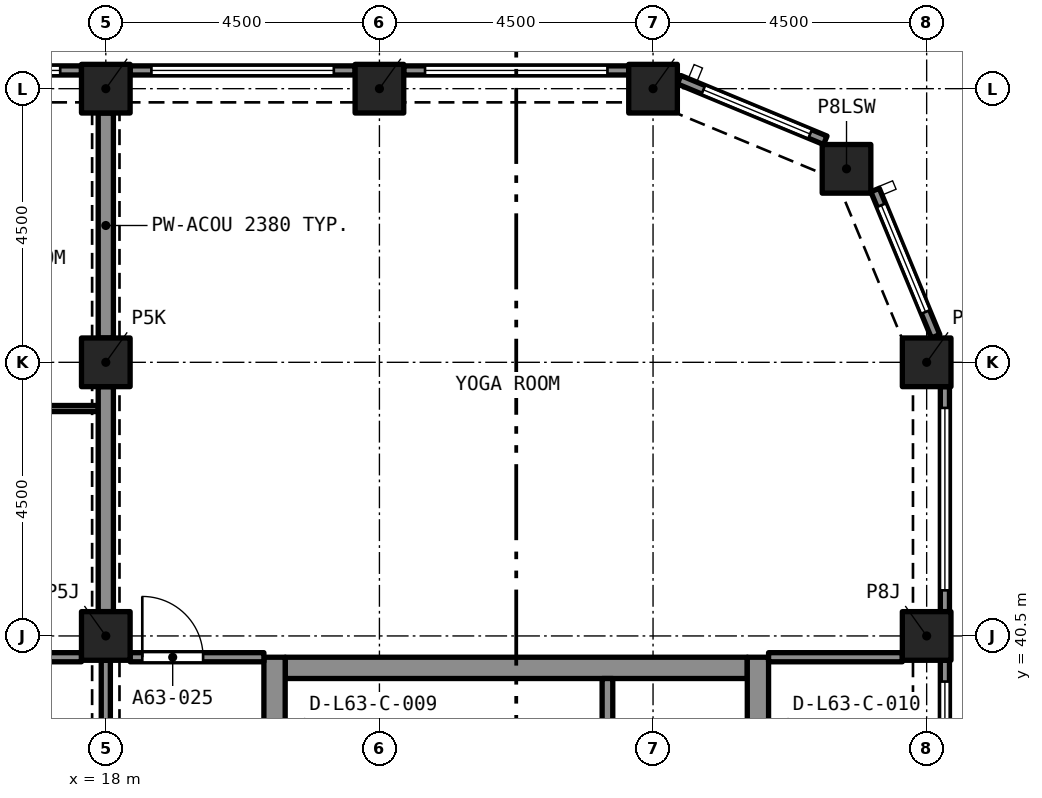
"""IFC4 building model, lengths in metres.
Left out: names, types, materials, properties, quantities, classifications, styles, units other than length and angle.
Written with IfcOpenShell. Run it as: python <this file> out.ifc"""

import sys

from ifc_helpers import new_model, si_unit, direction, frame, frame_2d, origin, origin_2d, place, context, subcontext, project, spatial, rectangle, extrude, element, fill, save


model = new_model("IFC4")
c1 = context("Model", 3, precision=1e-05, world=origin(), true_north=direction((0.0, 1.0)))
c2 = subcontext(c1, "Body", "Model", "MODEL_VIEW")
j1 = project(units=[si_unit("LENGTHUNIT", "METRE"), si_unit("PLANEANGLEUNIT", "RADIAN")], contexts=[c1])
p1 = place(None, origin())
s1 = spatial("IfcSite", under=j1, at=p1, CompositionType="ELEMENT")
p2 = place(p1, origin())
s2 = spatial("IfcBuilding", under=s1, at=p2, CompositionType="ELEMENT")
p3 = place(p2, frame((0.0, 0.0, 226.095)))
s3 = spatial("IfcBuildingStorey", under=s2, at=p3, CompositionType="ELEMENT", Elevation=226.095)
for number, where, z_axis, x_axis in (
    (1, (18.0, 40.5, 0.0), (0.0, 0.0, 1.0), (1.0, 0.0, 0.0)),
    (2, (31.5, 40.5, 0.0), (0.0, 0.0, 1.0), (1.0, 0.0, 0.0)),
    (3, (18.0, 45.0, 0.0), (0.0, 0.0, 1.0), (1.0, 0.0, 0.0)),
    (4, (31.5, 45.0, 0.0), (0.0, 0.0, 1.0), (1.0, 0.0, 0.0)),
    (5, (30.182, 48.182, 0.0), (0.0, 0.0, 1.0), (1.0, 0.0, 0.0)),
    (6, (18.0, 49.5, 0.0), (0.0, 0.0, 1.0), (1.0, 0.0, 0.0)),
    (7, (22.5, 49.5, 0.0), (0.0, 0.0, 1.0), (1.0, 0.0, 0.0)),
    (8, (27.0, 49.5, 0.0), (0.0, 0.0, 1.0), (1.0, 0.0, 0.0)),
):
    element("IfcColumn", number, at=place(p3, frame(where, z_axis=z_axis, x_axis=x_axis)), inside=s3, PredefinedType="COLUMN", context=c2, shape_type="SweptSolid", body=[
        extrude(rectangle(XDim=0.8, YDim=0.8, at=origin_2d()), origin(), (0.0, 0.0, 1.0), 3.2),
    ])
p4 = place(p3, frame((20.95, 39.975, 0.0), z_axis=(0.0, 0.0, 1.0), x_axis=(1.0, 0.0, 0.0)))
e9 = element("IfcWall", 9, at=p4, inside=s3, PredefinedType="SOLIDWALL", context=c2, shape_type="SweptSolid", body=[
    extrude(rectangle(XDim=7.6, YDim=0.35, at=frame_2d((3.8, 0.0))), origin(), (0.0, 0.0, 1.0), 3.2),
])
p5 = place(p3, frame((20.775, 27.35, 0.0), z_axis=(0.0, 0.0, 1.0), x_axis=(0.0, 1.0, 0.0)))
e10 = element("IfcWall", 10, at=p5, inside=s3, PredefinedType="SOLIDWALL", context=c2, shape_type="SweptSolid", body=[
    extrude(rectangle(XDim=12.8, YDim=0.35, at=frame_2d((6.4, 0.0))), origin(), (0.0, 0.0, 1.0), 3.2),
])
p6 = place(p5, frame((8.6, 0.0, 0.0)))
e11 = element("IfcOpeningElement", 11, at=p6, cuts=e10, PredefinedType="OPENING", context=c2, shape_type="SweptSolid", body=[
    extrude(rectangle(XDim=1.2, YDim=2.1, at=frame_2d((0.6, 1.05))), frame((0.0, 0.185, 0.0), z_axis=(0.0, -1.0, 0.0), x_axis=(1.0, 0.0, 0.0)), (0.0, 0.0, 1.0), 0.37),
])
p7 = place(p3, frame((28.725, 27.35, 0.0), z_axis=(0.0, 0.0, 1.0), x_axis=(0.0, 1.0, 0.0)))
e12 = element("IfcWall", 12, at=p7, inside=s3, PredefinedType="SOLIDWALL", context=c2, shape_type="SweptSolid", body=[
    extrude(rectangle(XDim=12.8, YDim=0.35, at=frame_2d((6.4, 0.0))), origin(), (0.0, 0.0, 1.0), 3.2),
])
p8 = place(p7, frame((8.6, 0.0, 0.0)))
e13 = element("IfcOpeningElement", 13, at=p8, cuts=e12, PredefinedType="OPENING", context=c2, shape_type="SweptSolid", body=[
    extrude(rectangle(XDim=1.2, YDim=2.1, at=frame_2d((0.6, 1.05))), frame((0.0, 0.185, 0.0), z_axis=(0.0, -1.0, 0.0), x_axis=(1.0, 0.0, 0.0)), (0.0, 0.0, 1.0), 0.37),
])
p9 = place(p3, frame((31.8, 40.1, 0.0), z_axis=(0.0, 0.0, 1.0), x_axis=(0.0, -1.0, 0.0)))
e14 = element("IfcWall", 14, at=p9, inside=s3, PredefinedType="SOLIDWALL", context=c2, shape_type="SweptSolid", body=[
    extrude(rectangle(XDim=3.7, YDim=0.15, at=frame_2d((1.85, 0.0))), origin(), (0.0, 0.0, 1.0), 3.2),
])
p10 = place(p9, frame((0.35, 0.0, 0.45)))
e15 = element("IfcOpeningElement", 15, at=p10, cuts=e14, PredefinedType="OPENING", context=c2, shape_type="SweptSolid", body=[
    extrude(rectangle(XDim=3.0, YDim=1.95, at=frame_2d((1.5, 0.975))), frame((0.0, 0.085, 0.0), z_axis=(0.0, -1.0, 0.0), x_axis=(1.0, 0.0, 0.0)), (0.0, 0.0, 1.0), 0.17),
])
p11 = place(p3, frame((31.8, 44.6, 0.0), z_axis=(0.0, 0.0, 1.0), x_axis=(0.0, -1.0, 0.0)))
e16 = element("IfcWall", 16, at=p11, inside=s3, PredefinedType="SOLIDWALL", context=c2, shape_type="SweptSolid", body=[
    extrude(rectangle(XDim=3.7, YDim=0.15, at=frame_2d((1.85, 0.0))), origin(), (0.0, 0.0, 1.0), 3.2),
])
p12 = place(p11, frame((0.35, 0.0, 0.45)))
e17 = element("IfcOpeningElement", 17, at=p12, cuts=e16, PredefinedType="OPENING", context=c2, shape_type="SweptSolid", body=[
    extrude(rectangle(XDim=3.0, YDim=1.95, at=frame_2d((1.5, 0.975))), frame((0.0, 0.085, 0.0), z_axis=(0.0, -1.0, 0.0), x_axis=(1.0, 0.0, 0.0)), (0.0, 0.0, 1.0), 0.17),
])
p13 = place(p3, frame((30.651, 47.833, 0.0), z_axis=(0.0, 0.0, 1.0), x_axis=(0.382669406082, -0.923885342263, 0.0)))
e18 = element("IfcWall", 18, at=p13, inside=s3, PredefinedType="SOLIDWALL", context=c2, shape_type="SweptSolid", body=[
    extrude(rectangle(XDim=2.602, YDim=0.15, at=frame_2d((1.301, 0.0))), origin(), (0.0, 0.0, 1.0), 3.2),
])
p14 = place(p13, frame((0.27, 0.0, 0.45)))
e19 = element("IfcOpeningElement", 19, at=p14, cuts=e18, PredefinedType="OPENING", context=c2, shape_type="SweptSolid", body=[
    extrude(rectangle(XDim=1.9, YDim=1.95, at=frame_2d((0.95, 0.975))), frame((0.0, 0.085, 0.0), z_axis=(0.0, -1.0, 0.0), x_axis=(1.0, 0.0, 0.0)), (0.0, 0.0, 1.0), 0.17),
])
p15 = place(p3, frame((27.429, 49.647, 0.0), z_axis=(0.0, 0.0, 1.0), x_axis=(0.923885342263, -0.382669406082, 0.0)))
e20 = element("IfcWall", 20, at=p15, inside=s3, PredefinedType="SOLIDWALL", context=c2, shape_type="SweptSolid", body=[
    extrude(rectangle(XDim=2.602, YDim=0.15, at=frame_2d((1.301, 0.0))), origin(), (0.0, 0.0, 1.0), 3.2),
])
p16 = place(p15, frame((0.432, 0.0, 0.45)))
e21 = element("IfcOpeningElement", 21, at=p16, cuts=e20, PredefinedType="OPENING", context=c2, shape_type="SweptSolid", body=[
    extrude(rectangle(XDim=1.9, YDim=1.95, at=frame_2d((0.95, 0.975))), frame((0.0, 0.085, 0.0), z_axis=(0.0, -1.0, 0.0), x_axis=(1.0, 0.0, 0.0)), (0.0, 0.0, 1.0), 0.17),
])
p17 = place(p3, frame((22.9, 49.8, 0.0), z_axis=(0.0, 0.0, 1.0), x_axis=(1.0, 0.0, 0.0)))
e22 = element("IfcWall", 22, at=p17, inside=s3, PredefinedType="SOLIDWALL", context=c2, shape_type="SweptSolid", body=[
    extrude(rectangle(XDim=3.7, YDim=0.15, at=frame_2d((1.85, 0.0))), origin(), (0.0, 0.0, 1.0), 3.2),
])
p18 = place(p17, frame((0.35, 0.0, 0.45)))
e23 = element("IfcOpeningElement", 23, at=p18, cuts=e22, PredefinedType="OPENING", context=c2, shape_type="SweptSolid", body=[
    extrude(rectangle(XDim=3.0, YDim=1.95, at=frame_2d((1.5, 0.975))), frame((0.0, 0.085, 0.0), z_axis=(0.0, -1.0, 0.0), x_axis=(1.0, 0.0, 0.0)), (0.0, 0.0, 1.0), 0.17),
])
p19 = place(p3, frame((18.4, 49.8, 0.0), z_axis=(0.0, 0.0, 1.0), x_axis=(1.0, 0.0, 0.0)))
e24 = element("IfcWall", 24, at=p19, inside=s3, PredefinedType="SOLIDWALL", context=c2, shape_type="SweptSolid", body=[
    extrude(rectangle(XDim=3.7, YDim=0.15, at=frame_2d((1.85, 0.0))), origin(), (0.0, 0.0, 1.0), 3.2),
])
p20 = place(p19, frame((0.35, 0.0, 0.45)))
e25 = element("IfcOpeningElement", 25, at=p20, cuts=e24, PredefinedType="OPENING", context=c2, shape_type="SweptSolid", body=[
    extrude(rectangle(XDim=3.0, YDim=1.95, at=frame_2d((1.5, 0.975))), frame((0.0, 0.085, 0.0), z_axis=(0.0, -1.0, 0.0), x_axis=(1.0, 0.0, 0.0)), (0.0, 0.0, 1.0), 0.17),
])
p21 = place(p3, frame((13.9, 49.8, 0.0), z_axis=(0.0, 0.0, 1.0), x_axis=(1.0, 0.0, 0.0)))
e26 = element("IfcWall", 26, at=p21, inside=s3, PredefinedType="SOLIDWALL", context=c2, shape_type="SweptSolid", body=[
    extrude(rectangle(XDim=3.7, YDim=0.15, at=frame_2d((1.85, 0.0))), origin(), (0.0, 0.0, 1.0), 3.2),
])
p22 = place(p21, frame((0.35, 0.0, 0.45)))
e27 = element("IfcOpeningElement", 27, at=p22, cuts=e26, PredefinedType="OPENING", context=c2, shape_type="SweptSolid", body=[
    extrude(rectangle(XDim=3.0, YDim=1.95, at=frame_2d((1.5, 0.975))), frame((0.0, 0.085, 0.0), z_axis=(0.0, -1.0, 0.0), x_axis=(1.0, 0.0, 0.0)), (0.0, 0.0, 1.0), 0.17),
])
p23 = place(p3, frame((13.5, 44.24, 0.0), z_axis=(0.0, 0.0, 1.0), x_axis=(1.0, 0.0, 0.0)))
e28 = element("IfcWall", 28, at=p23, inside=s3, PredefinedType="PARTITIONING", context=c2, shape_type="SweptSolid", body=[
    extrude(rectangle(XDim=4.375, YDim=0.1, at=frame_2d((2.188, 0.0))), origin(), (0.0, 0.0, 1.0), 2.9),
])
p24 = place(p23, frame((1.8, 0.0, 0.0)))
e29 = element("IfcOpeningElement", 29, at=p24, cuts=e28, PredefinedType="OPENING", context=c2, shape_type="SweptSolid", body=[
    extrude(rectangle(XDim=0.9, YDim=2.1, at=frame_2d((0.45, 1.05))), frame((0.0, 0.06, 0.0), z_axis=(0.0, -1.0, 0.0), x_axis=(1.0, 0.0, 0.0)), (0.0, 0.0, 1.0), 0.12),
])
for number, where, z_axis, x_axis in (
    (30, (18.0, 45.4, 0.0), (0.0, 0.0, 1.0), (0.0, 1.0, 0.0)),
    (31, (18.0, 40.9, 0.0), (0.0, 0.0, 1.0), (0.0, 1.0, 0.0)),
):
    element("IfcWall", number, at=place(p3, frame(where, z_axis=z_axis, x_axis=x_axis)), inside=s3, PredefinedType="PARTITIONING", context=c2, shape_type="SweptSolid", body=[
        extrude(rectangle(XDim=3.7, YDim=0.25, at=frame_2d((1.85, 0.0))), origin(), (0.0, 0.0, 1.0), 2.38),
    ])
p25 = place(p3, frame((14.95, 40.15, 0.0), z_axis=(0.0, 0.0, 1.0), x_axis=(1.0, 0.0, 0.0)))
e32 = element("IfcWall", 32, at=p25, inside=s3, PredefinedType="PARTITIONING", context=c2, shape_type="SweptSolid", body=[
    extrude(rectangle(XDim=2.65, YDim=0.15, at=frame_2d((1.325, 0.0))), origin(), (0.0, 0.0, 1.0), 2.9),
])
p26 = place(p25, frame((0.2, 0.0, 0.0)))
e33 = element("IfcOpeningElement", 33, at=p26, cuts=e32, PredefinedType="OPENING", context=c2, shape_type="SweptSolid", body=[
    extrude(rectangle(XDim=1.2, YDim=2.4, at=frame_2d((0.6, 1.2))), frame((0.0, 0.085, 0.0), z_axis=(0.0, -1.0, 0.0), x_axis=(1.0, 0.0, 0.0)), (0.0, 0.0, 1.0), 0.17),
])
p27 = place(p3, frame((18.4, 40.15, 0.0), z_axis=(0.0, 0.0, 1.0), x_axis=(1.0, 0.0, 0.0)))
e34 = element("IfcWall", 34, at=p27, inside=s3, PredefinedType="PARTITIONING", context=c2, shape_type="SweptSolid", body=[
    extrude(rectangle(XDim=2.2, YDim=0.15, at=frame_2d((1.1, 0.0))), origin(), (0.0, 0.0, 1.0), 2.75),
])
p28 = place(p27, frame((0.2, 0.0, 0.0)))
e35 = element("IfcOpeningElement", 35, at=p28, cuts=e34, PredefinedType="OPENING", context=c2, shape_type="SweptSolid", body=[
    extrude(rectangle(XDim=1.0, YDim=2.1, at=frame_2d((0.5, 1.05))), frame((0.0, 0.085, 0.0), z_axis=(0.0, -1.0, 0.0), x_axis=(1.0, 0.0, 0.0)), (0.0, 0.0, 1.0), 0.17),
])
p29 = place(p3, frame((28.9, 40.15, 0.0), z_axis=(0.0, 0.0, 1.0), x_axis=(1.0, 0.0, 0.0)))
e36 = element("IfcWall", 36, at=p29, inside=s3, PredefinedType="PARTITIONING", context=c2, shape_type="SweptSolid", body=[
    extrude(rectangle(XDim=2.2, YDim=0.15, at=frame_2d((1.1, 0.0))), origin(), (0.0, 0.0, 1.0), 2.75),
])
p30 = place(p3, frame((18.0, 40.1, 0.0), z_axis=(0.0, 0.0, 1.0), x_axis=(0.0, -1.0, 0.0)))
e37 = element("IfcWall", 37, at=p30, inside=s3, PredefinedType="PARTITIONING", context=c2, shape_type="SweptSolid", body=[
    extrude(rectangle(XDim=3.7, YDim=0.15, at=frame_2d((1.85, 0.0))), origin(), (0.0, 0.0, 1.0), 2.38),
])
p31 = place(p30, frame((1.25, 0.0, 0.0)))
e38 = element("IfcOpeningElement", 38, at=p31, cuts=e37, PredefinedType="OPENING", context=c2, shape_type="SweptSolid", body=[
    extrude(rectangle(XDim=1.2, YDim=2.1, at=frame_2d((0.6, 1.05))), frame((0.0, 0.085, 0.0), z_axis=(0.0, -1.0, 0.0), x_axis=(1.0, 0.0, 0.0)), (0.0, 0.0, 1.0), 0.17),
])
p32 = place(p3, frame((26.25, 37.5, 0.0), z_axis=(0.0, 0.0, 1.0), x_axis=(0.0, 1.0, 0.0)))
e39 = element("IfcWall", 39, at=p32, inside=s3, PredefinedType="SOLIDWALL", context=c2, shape_type="SweptSolid", body=[
    extrude(rectangle(XDim=2.3, YDim=0.175, at=frame_2d((1.15, 0.0))), origin(), (0.0, 0.0, 1.0), 2.9),
])
p33 = place(p10, origin())
e40 = element("IfcWindow", 40, at=p33, inside=s3, PartitioningType="SINGLE_PANEL", PredefinedType="WINDOW", context=c2, shape_type="SweptSolid", body=[
    extrude(rectangle(XDim=3.0, YDim=1.95, at=frame_2d((1.5, 0.975))), frame((0.0, 0.03, 0.0), z_axis=(0.0, -1.0, 0.0), x_axis=(1.0, 0.0, 0.0)), (0.0, 0.0, 1.0), 0.06),
])
fill(e15, e40)
p34 = place(p12, origin())
e41 = element("IfcWindow", 41, at=p34, inside=s3, PartitioningType="SINGLE_PANEL", PredefinedType="WINDOW", context=c2, shape_type="SweptSolid", body=[
    extrude(rectangle(XDim=3.0, YDim=1.95, at=frame_2d((1.5, 0.975))), frame((0.0, 0.03, 0.0), z_axis=(0.0, -1.0, 0.0), x_axis=(1.0, 0.0, 0.0)), (0.0, 0.0, 1.0), 0.06),
])
fill(e17, e41)
p35 = place(p14, origin())
e42 = element("IfcWindow", 42, at=p35, inside=s3, PartitioningType="SINGLE_PANEL", PredefinedType="WINDOW", context=c2, shape_type="SweptSolid", body=[
    extrude(rectangle(XDim=1.9, YDim=1.95, at=frame_2d((0.95, 0.975))), frame((0.0, 0.03, 0.0), z_axis=(0.0, -1.0, 0.0), x_axis=(1.0, 0.0, 0.0)), (0.0, 0.0, 1.0), 0.06),
])
fill(e19, e42)
p36 = place(p16, origin())
e43 = element("IfcWindow", 43, at=p36, inside=s3, PartitioningType="SINGLE_PANEL", PredefinedType="WINDOW", context=c2, shape_type="SweptSolid", body=[
    extrude(rectangle(XDim=1.9, YDim=1.95, at=frame_2d((0.95, 0.975))), frame((0.0, 0.03, 0.0), z_axis=(0.0, -1.0, 0.0), x_axis=(1.0, 0.0, 0.0)), (0.0, 0.0, 1.0), 0.06),
])
fill(e21, e43)
p37 = place(p18, origin())
e44 = element("IfcWindow", 44, at=p37, inside=s3, PartitioningType="SINGLE_PANEL", PredefinedType="WINDOW", context=c2, shape_type="SweptSolid", body=[
    extrude(rectangle(XDim=3.0, YDim=1.95, at=frame_2d((1.5, 0.975))), frame((0.0, 0.03, 0.0), z_axis=(0.0, -1.0, 0.0), x_axis=(1.0, 0.0, 0.0)), (0.0, 0.0, 1.0), 0.06),
])
fill(e23, e44)
p38 = place(p20, origin())
e45 = element("IfcWindow", 45, at=p38, inside=s3, PartitioningType="SINGLE_PANEL", PredefinedType="WINDOW", context=c2, shape_type="SweptSolid", body=[
    extrude(rectangle(XDim=3.0, YDim=1.95, at=frame_2d((1.5, 0.975))), frame((0.0, 0.03, 0.0), z_axis=(0.0, -1.0, 0.0), x_axis=(1.0, 0.0, 0.0)), (0.0, 0.0, 1.0), 0.06),
])
fill(e25, e45)
p39 = place(p22, origin())
e46 = element("IfcWindow", 46, at=p39, inside=s3, PartitioningType="SINGLE_PANEL", PredefinedType="WINDOW", context=c2, shape_type="SweptSolid", body=[
    extrude(rectangle(XDim=3.0, YDim=1.95, at=frame_2d((1.5, 0.975))), frame((0.0, 0.03, 0.0), z_axis=(0.0, -1.0, 0.0), x_axis=(1.0, 0.0, 0.0)), (0.0, 0.0, 1.0), 0.06),
])
fill(e27, e46)
p40 = place(p28, origin())
e47 = element("IfcDoor", 47, at=p40, inside=s3, OperationType="SINGLE_SWING_LEFT", PredefinedType="DOOR", context=c2, shape_type="SweptSolid", body=[
    extrude(rectangle(XDim=1.0, YDim=2.1, at=frame_2d((0.5, 1.05))), frame((0.0, 0.025, 0.0), z_axis=(0.0, -1.0, 0.0), x_axis=(1.0, 0.0, 0.0)), (0.0, 0.0, 1.0), 0.05),
])
fill(e35, e47)
save(model, sys.argv[1])
